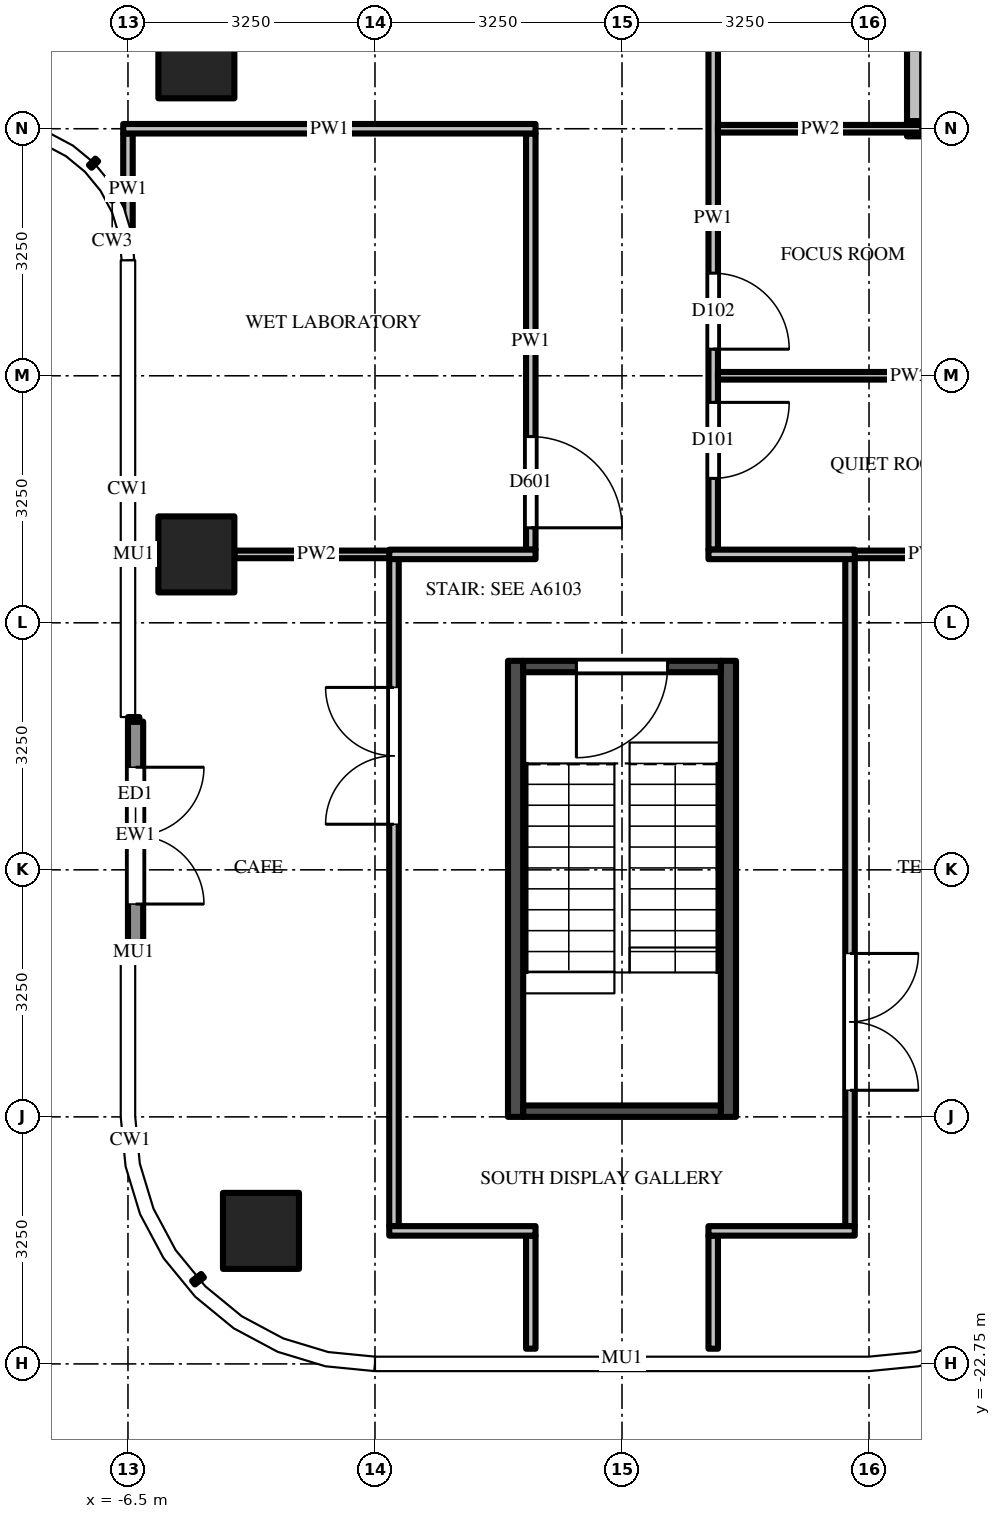
"""IFC4 building model, lengths in metres.
Left out: names, types, materials, properties, quantities, classifications, styles, units other than length and angle.
Written with IfcOpenShell. Run it as: python <this file> out.ifc"""

import sys

from ifc_helpers import new_model, si_unit, direction, frame, frame_2d, origin, origin_2d, place, context, subcontext, project, spatial, rectangle, extrude, source, transform, mapped, element, fill, save


model = new_model("IFC4")
c1 = context("Model", 3, precision=1e-05, world=origin(), true_north=direction((0.0, 1.0)))
c2 = subcontext(c1, "Body", "Model", "MODEL_VIEW")
j1 = project(units=[si_unit("LENGTHUNIT", "METRE"), si_unit("PLANEANGLEUNIT", "RADIAN")], contexts=[c1])
p1 = place(None, origin())
s1 = spatial("IfcSite", under=j1, at=p1, CompositionType="ELEMENT")
p2 = place(p1, origin())
s2 = spatial("IfcBuilding", under=s1, at=p2, CompositionType="ELEMENT")
p3 = place(p2, frame((0.0, 0.0, 298.9)))
s3 = spatial("IfcBuildingStorey", under=s2, at=p3, CompositionType="ELEMENT", Elevation=298.9)
m1 = source(origin(), c2, "Body", "SweptSolid", [
    extrude(rectangle(XDim=1.0, YDim=1.0, at=origin_2d()), origin(), (0.0, 0.0, 1.0), 3.9),
])
for number, where, z_axis, x_axis in (
    (1, (-5.6, -5.6, 0.0), (0.0, 0.0, 1.0), (1.0, 0.0, 0.0)),
    (2, (-5.6, -12.1, 0.0), (0.0, 0.0, 1.0), (1.0, 0.0, 0.0)),
    (3, (-4.75, -21.0, 0.0), (0.0, 0.0, 1.0), (1.0, 0.0, 0.0)),
):
    element("IfcColumn", number, at=place(p3, frame(where, z_axis=z_axis, x_axis=x_axis)), inside=s3, PredefinedType="COLUMN", context=c2, shape_type="MappedRepresentation", body=[
        mapped(m1, transform((0.0, 0.0, 0.0))),
    ])
m2 = source(origin(), c2, "Body", "SweptSolid", [
    extrude(rectangle(XDim=6.0, YDim=0.2, at=frame_2d((3.0, 0.0))), origin(), (0.0, 0.0, 1.0), 3.7),
])
for number, where, z_axis, x_axis in (
    (4, (1.4, -13.5, 0.0), (0.0, 0.0, 1.0), (0.0, -1.0, 0.0)),
    (5, (-1.4, -13.5, 0.0), (0.0, 0.0, 1.0), (0.0, -1.0, 0.0)),
):
    element("IfcWall", number, at=place(p3, frame(where, z_axis=z_axis, x_axis=x_axis)), inside=s3, PredefinedType="SHEAR", context=c2, shape_type="MappedRepresentation", body=[
        mapped(m2, transform((0.0, 0.0, 0.0))),
    ])
m3 = source(origin(), c2, "Body", "SweptSolid", [
    extrude(rectangle(XDim=2.6, YDim=0.15, at=frame_2d((1.3, 0.0))), origin(), (0.0, 0.0, 1.0), 3.7),
])
p4 = place(p3, frame((1.3, -13.575, 0.0), z_axis=(0.0, 0.0, 1.0), x_axis=(-1.0, 0.0, 0.0)))
e6 = element("IfcWall", 6, at=p4, inside=s3, PredefinedType="SHEAR", context=c2, shape_type="MappedRepresentation", body=[
    mapped(m3, transform((0.0, 0.0, 0.0))),
])
m4 = source(origin(), c2, "Body", "SweptSolid", [
    extrude(rectangle(XDim=1.2, YDim=2.1, at=frame_2d((0.6, 1.05))), frame((0.0, 0.085, 0.0), z_axis=(0.0, -1.0, 0.0), x_axis=(1.0, 0.0, 0.0)), (0.0, 0.0, 1.0), 0.17),
])
p5 = place(p4, frame((0.7, 0.0, 0.0)))
e7 = element("IfcOpeningElement", 7, at=p5, cuts=e6, PredefinedType="OPENING", context=c2, shape_type="MappedRepresentation", body=[
    mapped(m4, transform((0.0, 0.0, 0.0))),
])
p6 = place(p3, frame((1.3, -19.425, 0.0), z_axis=(0.0, 0.0, 1.0), x_axis=(-1.0, 0.0, 0.0)))
e8 = element("IfcWall", 8, at=p6, inside=s3, PredefinedType="SHEAR", context=c2, shape_type="MappedRepresentation", body=[
    mapped(m3, transform((0.0, 0.0, 0.0))),
])
m5 = source(origin(), c2, "Body", "SweptSolid", [
    extrude(rectangle(XDim=3.0, YDim=0.2, at=frame_2d((1.5, 0.0))), origin(), (0.0, 0.0, 1.0), 3.7),
])
p7 = place(p3, frame((-6.4, -14.3, 0.0), z_axis=(0.0, 0.0, 1.0), x_axis=(0.0, -1.0, 0.0)))
e9 = element("IfcWall", 9, at=p7, inside=s3, PredefinedType="SOLIDWALL", context=c2, shape_type="MappedRepresentation", body=[
    mapped(m5, transform((0.0, 0.0, 0.0))),
])
m6 = source(origin(), c2, "Body", "SweptSolid", [
    extrude(rectangle(XDim=1.8, YDim=2.4, at=frame_2d((0.9, 1.2))), frame((0.0, 0.11, 0.0), z_axis=(0.0, -1.0, 0.0), x_axis=(1.0, 0.0, 0.0)), (0.0, 0.0, 1.0), 0.22),
])
p8 = place(p7, frame((0.6, 0.0, 0.0)))
e10 = element("IfcOpeningElement", 10, at=p8, cuts=e9, PredefinedType="OPENING", context=c2, shape_type="MappedRepresentation", body=[
    mapped(m6, transform((0.0, 0.0, 0.0))),
])
m7 = source(origin(), c2, "Body", "SweptSolid", [
    extrude(rectangle(XDim=1.469, YDim=0.125, at=frame_2d((0.734, 0.0))), origin(), (0.0, 0.0, 1.0), 3.7),
])
p9 = place(p3, frame((-6.5, -6.562, 0.0), z_axis=(0.0, 0.0, 1.0), x_axis=(0.0, -1.0, 0.0)))
e11 = element("IfcWall", 11, at=p9, inside=s3, PredefinedType="PARTITIONING", context=c2, shape_type="MappedRepresentation", body=[
    mapped(m7, transform((0.0, 0.0, 0.0))),
])
m8 = source(origin(), c2, "Body", "SweptSolid", [
    extrude(rectangle(XDim=8.788, YDim=0.125, at=frame_2d((4.394, 0.0))), origin(), (0.0, 0.0, 1.0), 2.78),
])
p10 = place(p3, frame((-3.0, -20.938, 0.0), z_axis=(0.0, 0.0, 1.0), x_axis=(0.0, 1.0, 0.0)))
e12 = element("IfcWall", 12, at=p10, inside=s3, PredefinedType="PARTITIONING", context=c2, shape_type="MappedRepresentation", body=[
    mapped(m8, transform((0.0, 0.0, 0.0))),
])
m9 = source(origin(), c2, "Body", "SweptSolid", [
    extrude(rectangle(XDim=1.8, YDim=2.1, at=frame_2d((0.9, 1.05))), frame((0.0, 0.073, 0.0), z_axis=(0.0, -1.0, 0.0), x_axis=(1.0, 0.0, 0.0)), (0.0, 0.0, 1.0), 0.145),
])
p11 = place(p10, frame((5.288, 0.0, 0.0)))
e13 = element("IfcOpeningElement", 13, at=p11, cuts=e12, PredefinedType="OPENING", context=c2, shape_type="MappedRepresentation", body=[
    mapped(m9, transform((0.0, 0.0, 0.0))),
])
m10 = source(origin(), c2, "Body", "SweptSolid", [
    extrude(rectangle(XDim=1.488, YDim=0.125, at=frame_2d((0.744, 0.0))), origin(), (0.0, 0.0, 1.0), 2.78),
])
p12 = place(p3, frame((-1.2, -21.062, 0.0), z_axis=(0.0, 0.0, 1.0), x_axis=(0.0, -1.0, 0.0)))
e14 = element("IfcWall", 14, at=p12, inside=s3, PredefinedType="PARTITIONING", context=c2, shape_type="MappedRepresentation", body=[
    mapped(m10, transform((0.0, 0.0, 0.0))),
])
m11 = source(origin(), c2, "Body", "SweptSolid", [
    extrude(rectangle(XDim=5.475, YDim=0.125, at=frame_2d((2.738, 0.0))), origin(), (0.0, 0.0, 1.0), 2.997),
])
p13 = place(p3, frame((-1.2, -6.562, 0.0), z_axis=(0.0, 0.0, 1.0), x_axis=(0.0, -1.0, 0.0)))
e15 = element("IfcWall", 15, at=p13, inside=s3, PredefinedType="PARTITIONING", context=c2, shape_type="MappedRepresentation", body=[
    mapped(m11, transform((0.0, 0.0, 0.0))),
])
m12 = source(origin(), c2, "Body", "SweptSolid", [
    extrude(rectangle(XDim=1.2, YDim=2.1, at=frame_2d((0.6, 1.05))), frame((0.0, 0.073, 0.0), z_axis=(0.0, -1.0, 0.0), x_axis=(1.0, 0.0, 0.0)), (0.0, 0.0, 1.0), 0.145),
])
p14 = place(p13, frame((3.988, 0.0, 0.0)))
e16 = element("IfcOpeningElement", 16, at=p14, cuts=e15, PredefinedType="OPENING", context=c2, shape_type="MappedRepresentation", body=[
    mapped(m12, transform((0.0, 0.0, 0.0))),
])
p15 = place(p3, frame((1.2, -21.062, 0.0), z_axis=(0.0, 0.0, 1.0), x_axis=(0.0, -1.0, 0.0)))
e17 = element("IfcWall", 17, at=p15, inside=s3, PredefinedType="PARTITIONING", context=c2, shape_type="MappedRepresentation", body=[
    mapped(m10, transform((0.0, 0.0, 0.0))),
])
m13 = source(origin(), c2, "Body", "SweptSolid", [
    extrude(rectangle(XDim=8.725, YDim=0.125, at=frame_2d((4.363, 0.0))), origin(), (0.0, 0.0, 1.0), 2.997),
])
p16 = place(p3, frame((1.2, -3.312, 0.0), z_axis=(0.0, 0.0, 1.0), x_axis=(0.0, -1.0, 0.0)))
e18 = element("IfcWall", 18, at=p16, inside=s3, PredefinedType="PARTITIONING", context=c2, shape_type="MappedRepresentation", body=[
    mapped(m13, transform((0.0, 0.0, 0.0))),
])
m14 = source(origin(), c2, "Body", "SweptSolid", [
    extrude(rectangle(XDim=1.0, YDim=2.1, at=frame_2d((0.5, 1.05))), frame((0.0, 0.073, 0.0), z_axis=(0.0, -1.0, 0.0), x_axis=(1.0, 0.0, 0.0)), (0.0, 0.0, 1.0), 0.145),
])
p17 = place(p16, frame((6.788, 0.0, 0.0)))
e19 = element("IfcOpeningElement", 19, at=p17, cuts=e18, PredefinedType="OPENING", context=c2, shape_type="MappedRepresentation", body=[
    mapped(m14, transform((0.0, 0.0, 0.0))),
])
p18 = place(p16, frame((5.087, 0.0, 0.0)))
e20 = element("IfcOpeningElement", 20, at=p18, cuts=e18, PredefinedType="OPENING", context=c2, shape_type="MappedRepresentation", body=[
    mapped(m14, transform((0.0, 0.0, 0.0))),
])
m15 = source(origin(), c2, "Body", "SweptSolid", [
    extrude(rectangle(XDim=1.1, YDim=2.1, at=frame_2d((0.55, 1.05))), frame((0.0, 0.073, 0.0), z_axis=(0.0, -1.0, 0.0), x_axis=(1.0, 0.0, 0.0)), (0.0, 0.0, 1.0), 0.145),
])
p19 = place(p16, frame((0.288, 0.0, 0.0)))
e21 = element("IfcOpeningElement", 21, at=p19, cuts=e18, PredefinedType="OPENING", context=c2, shape_type="MappedRepresentation", body=[
    mapped(m15, transform((0.0, 0.0, 0.0))),
])
p20 = place(p3, frame((3.0, -12.15, 0.0), z_axis=(0.0, 0.0, 1.0), x_axis=(0.0, -1.0, 0.0)))
e22 = element("IfcWall", 22, at=p20, inside=s3, PredefinedType="PARTITIONING", context=c2, shape_type="MappedRepresentation", body=[
    mapped(m8, transform((0.0, 0.0, 0.0))),
])
p21 = place(p20, frame((5.2, 0.0, 0.0)))
e23 = element("IfcOpeningElement", 23, at=p21, cuts=e22, PredefinedType="OPENING", context=c2, shape_type="MappedRepresentation", body=[
    mapped(m9, transform((0.0, 0.0, 0.0))),
])
m16 = source(origin(), c2, "Body", "SweptSolid", [
    extrude(rectangle(XDim=3.087, YDim=0.2, at=frame_2d((1.544, 0.0))), origin(), (0.0, 0.0, 1.0), 2.997),
])
p22 = place(p3, frame((3.85, -6.4, 0.0), z_axis=(0.0, 0.0, 1.0), x_axis=(0.0, 1.0, 0.0)))
e24 = element("IfcWall", 24, at=p22, inside=s3, PredefinedType="PARTITIONING", context=c2, shape_type="MappedRepresentation", body=[
    mapped(m16, transform((0.0, 0.0, 0.0))),
])
m17 = source(origin(), c2, "Body", "SweptSolid", [
    extrude(rectangle(XDim=1.925, YDim=0.125, at=frame_2d((0.962, 0.0))), origin(), (0.0, 0.0, 1.0), 2.78),
])
for number, where, z_axis, x_axis in (
    (25, (-1.137, -21.0, 0.0), (0.0, 0.0, 1.0), (-1.0, 0.0, 0.0)),
    (26, (3.062, -21.0, 0.0), (0.0, 0.0, 1.0), (-1.0, 0.0, 0.0)),
):
    element("IfcWall", number, at=place(p3, frame(where, z_axis=z_axis, x_axis=x_axis)), inside=s3, PredefinedType="PARTITIONING", context=c2, shape_type="MappedRepresentation", body=[
        mapped(m17, transform((0.0, 0.0, 0.0))),
    ])
m18 = source(origin(), c2, "Body", "SweptSolid", [
    extrude(rectangle(XDim=2.163, YDim=0.1, at=frame_2d((1.081, 0.0))), origin(), (0.0, 0.0, 1.0), 2.997),
])
for number, where, z_axis, x_axis in (
    (27, (-5.1, -12.1, 0.0), (0.0, 0.0, 1.0), (1.0, 0.0, 0.0)),
    (28, (2.938, -12.1, 0.0), (0.0, 0.0, 1.0), (1.0, 0.0, 0.0)),
):
    element("IfcWall", number, at=place(p3, frame(where, z_axis=z_axis, x_axis=x_axis)), inside=s3, PredefinedType="PARTITIONING", context=c2, shape_type="MappedRepresentation", body=[
        mapped(m18, transform((0.0, 0.0, 0.0))),
    ])
m19 = source(origin(), c2, "Body", "SweptSolid", [
    extrude(rectangle(XDim=1.925, YDim=0.125, at=frame_2d((0.962, 0.0))), origin(), (0.0, 0.0, 1.0), 2.997),
])
for number, where, z_axis, x_axis in (
    (29, (-3.062, -12.1, 0.0), (0.0, 0.0, 1.0), (1.0, 0.0, 0.0)),
    (30, (1.137, -12.1, 0.0), (0.0, 0.0, 1.0), (1.0, 0.0, 0.0)),
):
    element("IfcWall", number, at=place(p3, frame(where, z_axis=z_axis, x_axis=x_axis)), inside=s3, PredefinedType="PARTITIONING", context=c2, shape_type="MappedRepresentation", body=[
        mapped(m19, transform((0.0, 0.0, 0.0))),
    ])
m20 = source(origin(), c2, "Body", "SweptSolid", [
    extrude(rectangle(XDim=5.038, YDim=0.1, at=frame_2d((2.519, 0.0))), origin(), (0.0, 0.0, 1.0), 2.78),
])
p23 = place(p3, frame((1.262, -9.75, 0.0), z_axis=(0.0, 0.0, 1.0), x_axis=(1.0, 0.0, 0.0)))
e31 = element("IfcWall", 31, at=p23, inside=s3, PredefinedType="PARTITIONING", context=c2, shape_type="MappedRepresentation", body=[
    mapped(m20, transform((0.0, 0.0, 0.0))),
])
m21 = source(origin(), c2, "Body", "SweptSolid", [
    extrude(rectangle(XDim=2.75, YDim=0.2, at=frame_2d((1.375, 0.0))), origin(), (0.0, 0.0, 1.0), 2.78),
])
p24 = place(p3, frame((3.75, -6.5, 0.0), z_axis=(0.0, 0.0, 1.0), x_axis=(1.0, 0.0, 0.0)))
e32 = element("IfcWall", 32, at=p24, inside=s3, PredefinedType="PARTITIONING", context=c2, shape_type="MappedRepresentation", body=[
    mapped(m21, transform((0.0, 0.0, 0.0))),
])
p25 = place(p3, frame((1.262, -6.5, 0.0), z_axis=(0.0, 0.0, 1.0), x_axis=(1.0, 0.0, 0.0)))
e33 = element("IfcWall", 33, at=p25, inside=s3, PredefinedType="PARTITIONING", context=c2, shape_type="SweptSolid", body=[
    extrude(rectangle(XDim=2.688, YDim=0.1, at=frame_2d((1.344, 0.0))), origin(), (0.0, 0.0, 1.0), 3.7),
])
m22 = source(origin(), c2, "Body", "SweptSolid", [
    extrude(rectangle(XDim=5.425, YDim=0.125, at=frame_2d((2.712, 0.0))), origin(), (0.0, 0.0, 1.0), 2.78),
])
p26 = place(p3, frame((-1.137, -6.5, 0.0), z_axis=(0.0, 0.0, 1.0), x_axis=(-1.0, 0.0, 0.0)))
e34 = element("IfcWall", 34, at=p26, inside=s3, PredefinedType="PARTITIONING", context=c2, shape_type="MappedRepresentation", body=[
    mapped(m22, transform((0.0, 0.0, 0.0))),
])
m23 = source(origin(), c2, "Body", "SweptSolid", [
    extrude(rectangle(XDim=1.2, YDim=2.1, at=frame_2d((0.6, 1.05))), frame((0.0, 0.025, 0.0), z_axis=(0.0, -1.0, 0.0), x_axis=(1.0, 0.0, 0.0)), (0.0, 0.0, 1.0), 0.05),
])
p27 = place(p5, origin())
e35 = element("IfcDoor", 35, at=p27, inside=s3, OperationType="SINGLE_SWING_RIGHT", PredefinedType="DOOR", context=c2, shape_type="MappedRepresentation", body=[
    mapped(m23, transform((0.0, 0.0, 0.0))),
])
fill(e7, e35)
m24 = source(origin(), c2, "Body", "SweptSolid", [
    extrude(rectangle(XDim=1.8, YDim=2.4, at=frame_2d((0.9, 1.2))), frame((0.0, 0.025, 0.0), z_axis=(0.0, -1.0, 0.0), x_axis=(1.0, 0.0, 0.0)), (0.0, 0.0, 1.0), 0.05),
])
p28 = place(p8, origin())
e36 = element("IfcDoor", 36, at=p28, inside=s3, OperationType="DOUBLE_DOOR_SINGLE_SWING", PredefinedType="DOOR", context=c2, shape_type="MappedRepresentation", body=[
    mapped(m24, transform((0.0, 0.0, 0.0))),
])
fill(e10, e36)
m25 = source(origin(), c2, "Body", "SweptSolid", [
    extrude(rectangle(XDim=1.8, YDim=2.1, at=frame_2d((0.9, 1.05))), frame((0.0, 0.025, 0.0), z_axis=(0.0, -1.0, 0.0), x_axis=(1.0, 0.0, 0.0)), (0.0, 0.0, 1.0), 0.05),
])
p29 = place(p21, origin())
e37 = element("IfcDoor", 37, at=p29, inside=s3, OperationType="DOUBLE_DOOR_SINGLE_SWING", PredefinedType="DOOR", context=c2, shape_type="MappedRepresentation", body=[
    mapped(m25, transform((0.0, 0.0, 0.0))),
])
fill(e23, e37)
p30 = place(p11, origin())
e38 = element("IfcDoor", 38, at=p30, inside=s3, OperationType="DOUBLE_DOOR_SINGLE_SWING", PredefinedType="DOOR", context=c2, shape_type="MappedRepresentation", body=[
    mapped(m25, transform((0.0, 0.0, 0.0))),
])
fill(e13, e38)
p31 = place(p14, origin())
e39 = element("IfcDoor", 39, at=p31, inside=s3, OperationType="SINGLE_SWING_RIGHT", PredefinedType="DOOR", context=c2, shape_type="MappedRepresentation", body=[
    mapped(m23, transform((0.0, 0.0, 0.0))),
])
fill(e16, e39)
m26 = source(origin(), c2, "Body", "SweptSolid", [
    extrude(rectangle(XDim=1.0, YDim=2.1, at=frame_2d((0.5, 1.05))), frame((0.0, 0.025, 0.0), z_axis=(0.0, -1.0, 0.0), x_axis=(1.0, 0.0, 0.0)), (0.0, 0.0, 1.0), 0.05),
])
p32 = place(p17, origin())
e40 = element("IfcDoor", 40, at=p32, inside=s3, OperationType="SINGLE_SWING_LEFT", PredefinedType="DOOR", context=c2, shape_type="MappedRepresentation", body=[
    mapped(m26, transform((0.0, 0.0, 0.0))),
])
fill(e19, e40)
p33 = place(p18, origin())
e41 = element("IfcDoor", 41, at=p33, inside=s3, OperationType="SINGLE_SWING_RIGHT", PredefinedType="DOOR", context=c2, shape_type="MappedRepresentation", body=[
    mapped(m26, transform((0.0, 0.0, 0.0))),
])
fill(e20, e41)
save(model, sys.argv[1])
